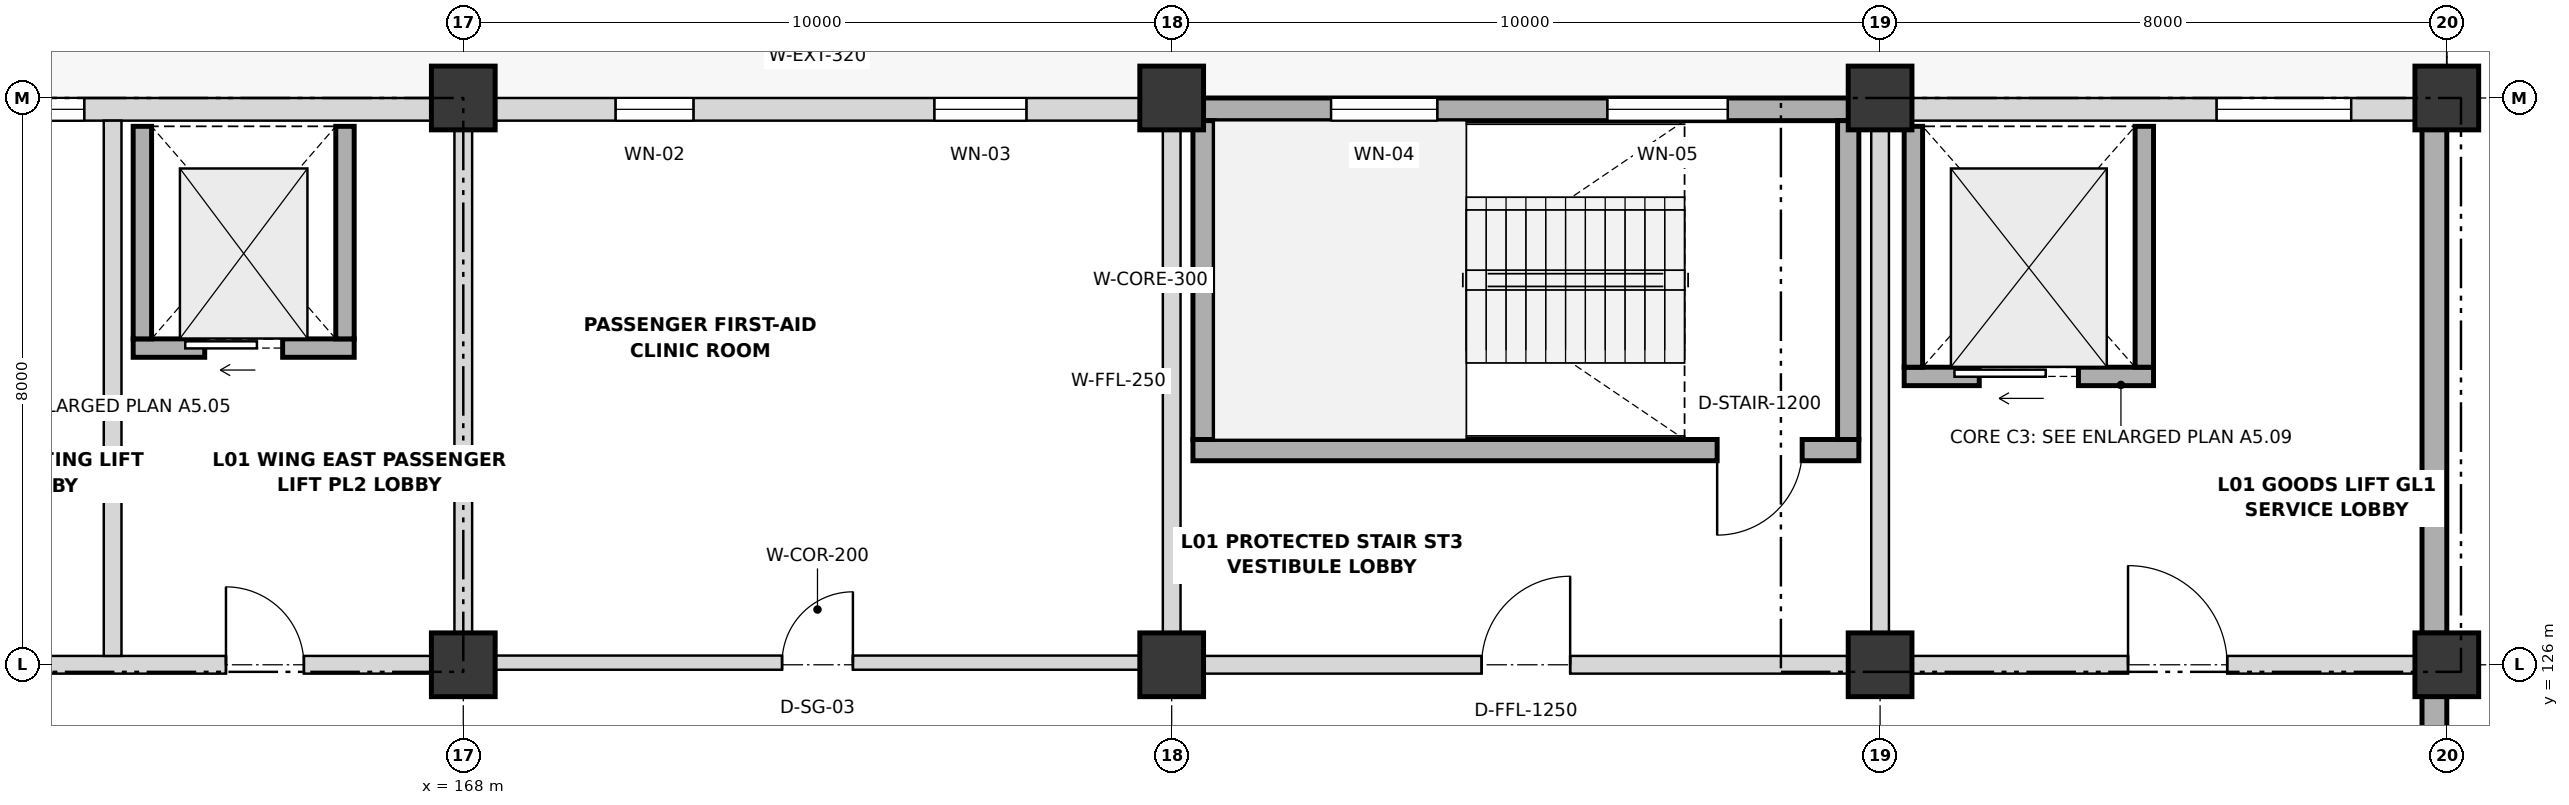
"""IFC4 building model, lengths in metres.
Left out: names, types, materials, properties, quantities, classifications, styles, units other than length and angle.
Written with IfcOpenShell. Run it as: python <this file> out.ifc"""

import sys

from ifc_helpers import new_model, si_unit, direction, frame, frame_2d, origin, origin_2d, place, context, subcontext, project, spatial, rectangle, extrude, element, fill, save


model = new_model("IFC4")
c1 = context("Model", 3, precision=1e-05, world=origin(), true_north=direction((0.0, 1.0)))
c2 = subcontext(c1, "Body", "Model", "MODEL_VIEW")
j1 = project(units=[si_unit("LENGTHUNIT", "METRE"), si_unit("PLANEANGLEUNIT", "RADIAN")], contexts=[c1])
p1 = place(None, origin())
s1 = spatial("IfcSite", under=j1, at=p1, CompositionType="ELEMENT")
p2 = place(p1, origin())
s2 = spatial("IfcBuilding", under=s1, at=p2, CompositionType="ELEMENT")
p3 = place(p2, frame((0.0, 0.0, 5.4)))
s3 = spatial("IfcBuildingStorey", under=s2, at=p3, CompositionType="ELEMENT", Elevation=5.4)
for number, where, z_axis, x_axis in (
    (1, (168.0, 126.0, 0.0), (0.0, 0.0, 1.0), (1.0, 0.0, 0.0)),
    (2, (168.0, 134.0, 0.0), (0.0, 0.0, 1.0), (1.0, 0.0, 0.0)),
    (3, (178.0, 126.0, 0.0), (0.0, 0.0, 1.0), (1.0, 0.0, 0.0)),
    (4, (178.0, 134.0, 0.0), (0.0, 0.0, 1.0), (1.0, 0.0, 0.0)),
    (5, (188.0, 126.0, 0.0), (0.0, 0.0, 1.0), (1.0, 0.0, 0.0)),
    (6, (188.0, 134.0, 0.0), (0.0, 0.0, 1.0), (1.0, 0.0, 0.0)),
    (7, (196.0, 126.0, 0.0), (0.0, 0.0, 1.0), (1.0, 0.0, 0.0)),
    (8, (196.0, 134.0, 0.0), (0.0, 0.0, 1.0), (1.0, 0.0, 0.0)),
):
    element("IfcColumn", number, at=place(p3, frame(where, z_axis=z_axis, x_axis=x_axis)), inside=s3, PredefinedType="COLUMN", context=c2, shape_type="SweptSolid", body=[
        extrude(rectangle(XDim=0.9, YDim=0.9, at=origin_2d()), origin(), (0.0, 0.0, 1.0), 4.2),
    ])
p4 = place(p3, frame((195.825, 125.555, 0.0), z_axis=(0.0, 0.0, 1.0), x_axis=(0.0, -1.0, 0.0)))
e9 = element("IfcWall", 9, at=p4, inside=s3, PredefinedType="SOLIDWALL", context=c2, shape_type="SweptSolid", body=[
    extrude(rectangle(XDim=11.11, YDim=0.35, at=frame_2d((5.555, 0.0))), origin(), (0.0, 0.0, 1.0), 4.2),
])
p5 = place(p3, frame((195.825, 133.555, 0.0), z_axis=(0.0, 0.0, 1.0), x_axis=(0.0, -1.0, 0.0)))
e10 = element("IfcWall", 10, at=p5, inside=s3, PredefinedType="SOLIDWALL", context=c2, shape_type="SweptSolid", body=[
    extrude(rectangle(XDim=7.11, YDim=0.35, at=frame_2d((3.555, 0.0))), origin(), (0.0, 0.0, 1.0), 4.2),
])
p6 = place(p3, frame((158.445, 133.84, 0.0), z_axis=(0.0, 0.0, 1.0), x_axis=(1.0, 0.0, 0.0)))
e11 = element("IfcWall", 11, at=p6, inside=s3, PredefinedType="SOLIDWALL", context=c2, shape_type="SweptSolid", body=[
    extrude(rectangle(XDim=9.11, YDim=0.32, at=frame_2d((4.555, 0.0))), origin(), (0.0, 0.0, 1.0), 3.118),
])
p7 = place(p6, frame((3.305, 0.0, 1.05)))
e12 = element("IfcOpeningElement", 12, at=p7, cuts=e11, PredefinedType="OPENING", context=c2, shape_type="SweptSolid", body=[
    extrude(rectangle(XDim=0.9, YDim=1.15, at=frame_2d((0.45, 0.575))), frame((0.0, 0.17, 0.0), z_axis=(0.0, -1.0, 0.0), x_axis=(1.0, 0.0, 0.0)), (0.0, 0.0, 1.0), 0.34),
])
p8 = place(p3, frame((168.445, 133.84, 0.0), z_axis=(0.0, 0.0, 1.0), x_axis=(1.0, 0.0, 0.0)))
e13 = element("IfcWall", 13, at=p8, inside=s3, PredefinedType="SOLIDWALL", context=c2, shape_type="SweptSolid", body=[
    extrude(rectangle(XDim=9.11, YDim=0.32, at=frame_2d((4.555, 0.0))), origin(), (0.0, 0.0, 1.0), 3.118),
])
p9 = place(p8, frame((1.705, 0.0, 1.05)))
e14 = element("IfcOpeningElement", 14, at=p9, cuts=e13, PredefinedType="OPENING", context=c2, shape_type="SweptSolid", body=[
    extrude(rectangle(XDim=1.1, YDim=1.15, at=frame_2d((0.55, 0.575))), frame((0.0, 0.17, 0.0), z_axis=(0.0, -1.0, 0.0), x_axis=(1.0, 0.0, 0.0)), (0.0, 0.0, 1.0), 0.34),
])
p10 = place(p8, frame((6.205, 0.0, 1.05)))
e15 = element("IfcOpeningElement", 15, at=p10, cuts=e13, PredefinedType="OPENING", context=c2, shape_type="SweptSolid", body=[
    extrude(rectangle(XDim=1.3, YDim=1.15, at=frame_2d((0.65, 0.575))), frame((0.0, 0.17, 0.0), z_axis=(0.0, -1.0, 0.0), x_axis=(1.0, 0.0, 0.0)), (0.0, 0.0, 1.0), 0.34),
])
p11 = place(p3, frame((178.445, 133.84, 0.0), z_axis=(0.0, 0.0, 1.0), x_axis=(1.0, 0.0, 0.0)))
e16 = element("IfcWall", 16, at=p11, inside=s3, PredefinedType="SHEAR", context=c2, shape_type="SweptSolid", body=[
    extrude(rectangle(XDim=9.11, YDim=0.32, at=frame_2d((4.555, 0.0))), origin(), (0.0, 0.0, 1.0), 4.2),
])
p12 = place(p11, frame((1.805, 0.0, 1.05)))
e17 = element("IfcOpeningElement", 17, at=p12, cuts=e16, PredefinedType="OPENING", context=c2, shape_type="SweptSolid", body=[
    extrude(rectangle(XDim=1.5, YDim=1.15, at=frame_2d((0.75, 0.575))), frame((0.0, 0.17, 0.0), z_axis=(0.0, -1.0, 0.0), x_axis=(1.0, 0.0, 0.0)), (0.0, 0.0, 1.0), 0.34),
])
p13 = place(p11, frame((5.705, 0.0, 1.05)))
e18 = element("IfcOpeningElement", 18, at=p13, cuts=e16, PredefinedType="OPENING", context=c2, shape_type="SweptSolid", body=[
    extrude(rectangle(XDim=1.7, YDim=1.15, at=frame_2d((0.85, 0.575))), frame((0.0, 0.17, 0.0), z_axis=(0.0, -1.0, 0.0), x_axis=(1.0, 0.0, 0.0)), (0.0, 0.0, 1.0), 0.34),
])
p14 = place(p3, frame((188.445, 133.84, 0.0), z_axis=(0.0, 0.0, 1.0), x_axis=(1.0, 0.0, 0.0)))
e19 = element("IfcWall", 19, at=p14, inside=s3, PredefinedType="SOLIDWALL", context=c2, shape_type="SweptSolid", body=[
    extrude(rectangle(XDim=7.11, YDim=0.32, at=frame_2d((3.555, 0.0))), origin(), (0.0, 0.0, 1.0), 3.118),
])
p15 = place(p14, frame((4.305, 0.0, 1.05)))
e20 = element("IfcOpeningElement", 20, at=p15, cuts=e19, PredefinedType="OPENING", context=c2, shape_type="SweptSolid", body=[
    extrude(rectangle(XDim=1.9, YDim=1.15, at=frame_2d((0.95, 0.575))), frame((0.0, 0.17, 0.0), z_axis=(0.0, -1.0, 0.0), x_axis=(1.0, 0.0, 0.0)), (0.0, 0.0, 1.0), 0.34),
])
p16 = place(p3, frame((187.7, 129.03, 0.0), z_axis=(0.0, 0.0, 1.0), x_axis=(-1.0, 0.0, 0.0)))
e21 = element("IfcWall", 21, at=p16, inside=s3, PredefinedType="SHEAR", context=c2, shape_type="SweptSolid", body=[
    extrude(rectangle(XDim=9.4, YDim=0.3, at=frame_2d((4.7, 0.0))), origin(), (0.0, 0.0, 1.0), 4.2),
])
p17 = place(p16, frame((0.8, 0.0, 0.0)))
e22 = element("IfcOpeningElement", 22, at=p17, cuts=e21, PredefinedType="OPENING", context=c2, shape_type="SweptSolid", body=[
    extrude(rectangle(XDim=1.2, YDim=2.15, at=frame_2d((0.6, 1.075))), frame((0.0, 0.16, 0.0), z_axis=(0.0, -1.0, 0.0), x_axis=(1.0, 0.0, 0.0)), (0.0, 0.0, 1.0), 0.32),
])
for number, where, z_axis, x_axis in (
    (23, (187.55, 133.68, 0.0), (0.0, 0.0, 1.0), (0.0, -1.0, 0.0)),
    (24, (178.45, 129.18, 0.0), (0.0, 0.0, 1.0), (0.0, 1.0, 0.0)),
):
    element("IfcWall", number, at=place(p3, frame(where, z_axis=z_axis, x_axis=x_axis)), inside=s3, PredefinedType="SHEAR", context=c2, shape_type="SweptSolid", body=[
        extrude(rectangle(XDim=4.5, YDim=0.3, at=frame_2d((2.25, 0.0))), origin(), (0.0, 0.0, 1.0), 4.2),
    ])
p18 = place(p3, frame((163.34, 130.47, 0.0), z_axis=(0.0, 0.0, 1.0), x_axis=(1.0, 0.0, 0.0)))
e25 = element("IfcWall", 25, at=p18, inside=s3, PredefinedType="SHEAR", context=c2, shape_type="SweptSolid", body=[
    extrude(rectangle(XDim=3.12, YDim=0.26, at=frame_2d((1.56, 0.0))), origin(), (0.0, 0.0, 1.0), 4.2),
])
p19 = place(p18, frame((1.01, 0.0, 0.0)))
e26 = element("IfcOpeningElement", 26, at=p19, cuts=e25, PredefinedType="OPENING", context=c2, shape_type="SweptSolid", body=[
    extrude(rectangle(XDim=1.1, YDim=2.15, at=frame_2d((0.55, 1.075))), frame((0.0, 0.14, 0.0), z_axis=(0.0, -1.0, 0.0), x_axis=(1.0, 0.0, 0.0)), (0.0, 0.0, 1.0), 0.28),
])
for number, where, z_axis, x_axis in (
    (27, (163.47, 130.6, 0.0), (0.0, 0.0, 1.0), (0.0, 1.0, 0.0)),
    (28, (166.33, 130.6, 0.0), (0.0, 0.0, 1.0), (0.0, 1.0, 0.0)),
):
    element("IfcWall", number, at=place(p3, frame(where, z_axis=z_axis, x_axis=x_axis)), inside=s3, PredefinedType="SHEAR", context=c2, shape_type="SweptSolid", body=[
        extrude(rectangle(XDim=3.0, YDim=0.26, at=frame_2d((1.5, 0.0))), origin(), (0.0, 0.0, 1.0), 4.2),
    ])
p20 = place(p3, frame((188.34, 130.07, 0.0), z_axis=(0.0, 0.0, 1.0), x_axis=(1.0, 0.0, 0.0)))
e29 = element("IfcWall", 29, at=p20, inside=s3, PredefinedType="SHEAR", context=c2, shape_type="SweptSolid", body=[
    extrude(rectangle(XDim=3.52, YDim=0.26, at=frame_2d((1.76, 0.0))), origin(), (0.0, 0.0, 1.0), 4.2),
])
p21 = place(p20, frame((1.06, 0.0, 0.0)))
e30 = element("IfcOpeningElement", 30, at=p21, cuts=e29, PredefinedType="OPENING", context=c2, shape_type="SweptSolid", body=[
    extrude(rectangle(XDim=1.4, YDim=2.2, at=frame_2d((0.7, 1.1))), frame((0.0, 0.14, 0.0), z_axis=(0.0, -1.0, 0.0), x_axis=(1.0, 0.0, 0.0)), (0.0, 0.0, 1.0), 0.28),
])
for number, where, z_axis, x_axis in (
    (31, (188.47, 130.2, 0.0), (0.0, 0.0, 1.0), (0.0, 1.0, 0.0)),
    (32, (191.73, 130.2, 0.0), (0.0, 0.0, 1.0), (0.0, 1.0, 0.0)),
):
    element("IfcWall", number, at=place(p3, frame(where, z_axis=z_axis, x_axis=x_axis)), inside=s3, PredefinedType="SHEAR", context=c2, shape_type="SweptSolid", body=[
        extrude(rectangle(XDim=3.4, YDim=0.26, at=frame_2d((1.7, 0.0))), origin(), (0.0, 0.0, 1.0), 4.2),
    ])
p22 = place(p3, frame((158.455, 126.0, 0.0), z_axis=(0.0, 0.0, 1.0), x_axis=(1.0, 0.0, 0.0)))
e33 = element("IfcWall", 33, at=p22, inside=s3, PredefinedType="PARTITIONING", context=c2, shape_type="SweptSolid", body=[
    extrude(rectangle(XDim=9.09, YDim=0.25, at=frame_2d((4.545, 0.0))), origin(), (0.0, 0.0, 1.0), 3.018),
])
p23 = place(p22, frame((1.72, 0.0, 0.0)))
e34 = element("IfcOpeningElement", 34, at=p23, cuts=e33, PredefinedType="OPENING", context=c2, shape_type="SweptSolid", body=[
    extrude(rectangle(XDim=1.25, YDim=2.15, at=frame_2d((0.625, 1.075))), frame((0.0, 0.135, 0.0), z_axis=(0.0, -1.0, 0.0), x_axis=(1.0, 0.0, 0.0)), (0.0, 0.0, 1.0), 0.27),
])
p24 = place(p22, frame((6.195, 0.0, 0.0)))
e35 = element("IfcOpeningElement", 35, at=p24, cuts=e33, PredefinedType="OPENING", context=c2, shape_type="SweptSolid", body=[
    extrude(rectangle(XDim=1.1, YDim=2.15, at=frame_2d((0.55, 1.075))), frame((0.0, 0.135, 0.0), z_axis=(0.0, -1.0, 0.0), x_axis=(1.0, 0.0, 0.0)), (0.0, 0.0, 1.0), 0.27),
])
p25 = place(p3, frame((178.455, 126.0, 0.0), z_axis=(0.0, 0.0, 1.0), x_axis=(1.0, 0.0, 0.0)))
e36 = element("IfcWall", 36, at=p25, inside=s3, PredefinedType="PARTITIONING", context=c2, shape_type="SweptSolid", body=[
    extrude(rectangle(XDim=9.09, YDim=0.25, at=frame_2d((4.545, 0.0))), origin(), (0.0, 0.0, 1.0), 3.018),
])
p26 = place(p25, frame((3.92, 0.0, 0.0)))
e37 = element("IfcOpeningElement", 37, at=p26, cuts=e36, PredefinedType="OPENING", context=c2, shape_type="SweptSolid", body=[
    extrude(rectangle(XDim=1.25, YDim=2.15, at=frame_2d((0.625, 1.075))), frame((0.0, 0.135, 0.0), z_axis=(0.0, -1.0, 0.0), x_axis=(1.0, 0.0, 0.0)), (0.0, 0.0, 1.0), 0.27),
])
p27 = place(p3, frame((188.455, 126.0, 0.0), z_axis=(0.0, 0.0, 1.0), x_axis=(1.0, 0.0, 0.0)))
e38 = element("IfcWall", 38, at=p27, inside=s3, PredefinedType="PARTITIONING", context=c2, shape_type="SweptSolid", body=[
    extrude(rectangle(XDim=7.09, YDim=0.25, at=frame_2d((3.545, 0.0))), origin(), (0.0, 0.0, 1.0), 3.018),
])
p28 = place(p27, frame((3.045, 0.0, 0.0)))
e39 = element("IfcOpeningElement", 39, at=p28, cuts=e38, PredefinedType="OPENING", context=c2, shape_type="SweptSolid", body=[
    extrude(rectangle(XDim=1.4, YDim=2.2, at=frame_2d((0.7, 1.1))), frame((0.0, 0.135, 0.0), z_axis=(0.0, -1.0, 0.0), x_axis=(1.0, 0.0, 0.0)), (0.0, 0.0, 1.0), 0.27),
])
p29 = place(p3, frame((163.05, 126.125, 0.0), z_axis=(0.0, 0.0, 1.0), x_axis=(0.0, 1.0, 0.0)))
e40 = element("IfcWall", 40, at=p29, inside=s3, PredefinedType="PARTITIONING", context=c2, shape_type="SweptSolid", body=[
    extrude(rectangle(XDim=7.555, YDim=0.25, at=frame_2d((3.777, 0.0))), origin(), (0.0, 0.0, 1.0), 3.018),
])
for number, where, z_axis, x_axis in (
    (41, (168.0, 126.455, 0.0), (0.0, 0.0, 1.0), (0.0, 1.0, 0.0)),
    (42, (178.0, 126.455, 0.0), (0.0, 0.0, 1.0), (0.0, 1.0, 0.0)),
    (43, (188.0, 126.455, 0.0), (0.0, 0.0, 1.0), (0.0, 1.0, 0.0)),
):
    element("IfcWall", number, at=place(p3, frame(where, z_axis=z_axis, x_axis=x_axis)), inside=s3, PredefinedType="PARTITIONING", context=c2, shape_type="SweptSolid", body=[
        extrude(rectangle(XDim=7.09, YDim=0.25, at=frame_2d((3.545, 0.0))), origin(), (0.0, 0.0, 1.0), 3.118),
    ])
p30 = place(p3, frame((168.3, 126.03, 0.0), z_axis=(0.0, 0.0, 1.0), x_axis=(1.0, 0.0, 0.0)))
e44 = element("IfcWall", 44, at=p30, inside=s3, PredefinedType="PARTITIONING", context=c2, shape_type="SweptSolid", body=[
    extrude(rectangle(XDim=9.4, YDim=0.2, at=frame_2d((4.7, 0.0))), origin(), (0.0, 0.0, 1.0), 3.018),
])
p31 = place(p30, frame((4.2, 0.0, 0.0)))
e45 = element("IfcOpeningElement", 45, at=p31, cuts=e44, PredefinedType="OPENING", context=c2, shape_type="SweptSolid", body=[
    extrude(rectangle(XDim=1.0, YDim=2.1, at=frame_2d((0.5, 1.05))), frame((0.0, 0.11, 0.0), z_axis=(0.0, -1.0, 0.0), x_axis=(1.0, 0.0, 0.0)), (0.0, 0.0, 1.0), 0.22),
])
p32 = place(p7, origin())
e46 = element("IfcWindow", 46, at=p32, inside=s3, PartitioningType="SINGLE_PANEL", PredefinedType="WINDOW", context=c2, shape_type="SweptSolid", body=[
    extrude(rectangle(XDim=0.9, YDim=1.15, at=frame_2d((0.45, 0.575))), frame((0.0, 0.03, 0.0), z_axis=(0.0, -1.0, 0.0), x_axis=(1.0, 0.0, 0.0)), (0.0, 0.0, 1.0), 0.06),
])
fill(e12, e46)
p33 = place(p9, origin())
e47 = element("IfcWindow", 47, at=p33, inside=s3, PartitioningType="SINGLE_PANEL", PredefinedType="WINDOW", context=c2, shape_type="SweptSolid", body=[
    extrude(rectangle(XDim=1.1, YDim=1.15, at=frame_2d((0.55, 0.575))), frame((0.0, 0.03, 0.0), z_axis=(0.0, -1.0, 0.0), x_axis=(1.0, 0.0, 0.0)), (0.0, 0.0, 1.0), 0.06),
])
fill(e14, e47)
p34 = place(p10, origin())
e48 = element("IfcWindow", 48, at=p34, inside=s3, PartitioningType="SINGLE_PANEL", PredefinedType="WINDOW", context=c2, shape_type="SweptSolid", body=[
    extrude(rectangle(XDim=1.3, YDim=1.15, at=frame_2d((0.65, 0.575))), frame((0.0, 0.03, 0.0), z_axis=(0.0, -1.0, 0.0), x_axis=(1.0, 0.0, 0.0)), (0.0, 0.0, 1.0), 0.06),
])
fill(e15, e48)
p35 = place(p12, origin())
e49 = element("IfcWindow", 49, at=p35, inside=s3, PartitioningType="SINGLE_PANEL", PredefinedType="WINDOW", context=c2, shape_type="SweptSolid", body=[
    extrude(rectangle(XDim=1.5, YDim=1.15, at=frame_2d((0.75, 0.575))), frame((0.0, 0.03, 0.0), z_axis=(0.0, -1.0, 0.0), x_axis=(1.0, 0.0, 0.0)), (0.0, 0.0, 1.0), 0.06),
])
fill(e17, e49)
p36 = place(p13, origin())
e50 = element("IfcWindow", 50, at=p36, inside=s3, PartitioningType="SINGLE_PANEL", PredefinedType="WINDOW", context=c2, shape_type="SweptSolid", body=[
    extrude(rectangle(XDim=1.7, YDim=1.15, at=frame_2d((0.85, 0.575))), frame((0.0, 0.03, 0.0), z_axis=(0.0, -1.0, 0.0), x_axis=(1.0, 0.0, 0.0)), (0.0, 0.0, 1.0), 0.06),
])
fill(e18, e50)
p37 = place(p15, origin())
e51 = element("IfcWindow", 51, at=p37, inside=s3, PartitioningType="SINGLE_PANEL", PredefinedType="WINDOW", context=c2, shape_type="SweptSolid", body=[
    extrude(rectangle(XDim=1.9, YDim=1.15, at=frame_2d((0.95, 0.575))), frame((0.0, 0.03, 0.0), z_axis=(0.0, -1.0, 0.0), x_axis=(1.0, 0.0, 0.0)), (0.0, 0.0, 1.0), 0.06),
])
fill(e20, e51)
p38 = place(p17, origin())
e52 = element("IfcDoor", 52, at=p38, inside=s3, OperationType="SINGLE_SWING_RIGHT", PredefinedType="DOOR", context=c2, shape_type="SweptSolid", body=[
    extrude(rectangle(XDim=1.2, YDim=2.15, at=frame_2d((0.6, 1.075))), frame((0.0, 0.025, 0.0), z_axis=(0.0, -1.0, 0.0), x_axis=(1.0, 0.0, 0.0)), (0.0, 0.0, 1.0), 0.05),
])
fill(e22, e52)
p39 = place(p19, origin())
e53 = element("IfcDoor", 53, at=p39, inside=s3, OperationType="SLIDING_TO_LEFT", PredefinedType="DOOR", context=c2, shape_type="SweptSolid", body=[
    extrude(rectangle(XDim=1.1, YDim=2.15, at=frame_2d((0.55, 1.075))), frame((0.0, 0.025, 0.0), z_axis=(0.0, -1.0, 0.0), x_axis=(1.0, 0.0, 0.0)), (0.0, 0.0, 1.0), 0.05),
])
fill(e26, e53)
p40 = place(p21, origin())
e54 = element("IfcDoor", 54, at=p40, inside=s3, OperationType="SLIDING_TO_LEFT", PredefinedType="DOOR", context=c2, shape_type="SweptSolid", body=[
    extrude(rectangle(XDim=1.4, YDim=2.2, at=frame_2d((0.7, 1.1))), frame((0.0, 0.025, 0.0), z_axis=(0.0, -1.0, 0.0), x_axis=(1.0, 0.0, 0.0)), (0.0, 0.0, 1.0), 0.05),
])
fill(e30, e54)
p41 = place(p24, origin())
e55 = element("IfcDoor", 55, at=p41, inside=s3, OperationType="SINGLE_SWING_LEFT", PredefinedType="DOOR", context=c2, shape_type="SweptSolid", body=[
    extrude(rectangle(XDim=1.1, YDim=2.15, at=frame_2d((0.55, 1.075))), frame((0.0, 0.025, 0.0), z_axis=(0.0, -1.0, 0.0), x_axis=(1.0, 0.0, 0.0)), (0.0, 0.0, 1.0), 0.05),
])
fill(e35, e55)
p42 = place(p26, origin())
e56 = element("IfcDoor", 56, at=p42, inside=s3, OperationType="SINGLE_SWING_RIGHT", PredefinedType="DOOR", context=c2, shape_type="SweptSolid", body=[
    extrude(rectangle(XDim=1.25, YDim=2.15, at=frame_2d((0.625, 1.075))), frame((0.0, 0.025, 0.0), z_axis=(0.0, -1.0, 0.0), x_axis=(1.0, 0.0, 0.0)), (0.0, 0.0, 1.0), 0.05),
])
fill(e37, e56)
p43 = place(p28, origin())
e57 = element("IfcDoor", 57, at=p43, inside=s3, OperationType="SINGLE_SWING_LEFT", PredefinedType="DOOR", context=c2, shape_type="SweptSolid", body=[
    extrude(rectangle(XDim=1.4, YDim=2.2, at=frame_2d((0.7, 1.1))), frame((0.0, 0.025, 0.0), z_axis=(0.0, -1.0, 0.0), x_axis=(1.0, 0.0, 0.0)), (0.0, 0.0, 1.0), 0.05),
])
fill(e39, e57)
p44 = place(p31, origin())
e58 = element("IfcDoor", 58, at=p44, inside=s3, OperationType="SINGLE_SWING_RIGHT", PredefinedType="DOOR", context=c2, shape_type="SweptSolid", body=[
    extrude(rectangle(XDim=1.0, YDim=2.1, at=frame_2d((0.5, 1.05))), frame((0.0, 0.025, 0.0), z_axis=(0.0, -1.0, 0.0), x_axis=(1.0, 0.0, 0.0)), (0.0, 0.0, 1.0), 0.05),
])
fill(e45, e58)
save(model, sys.argv[1])
